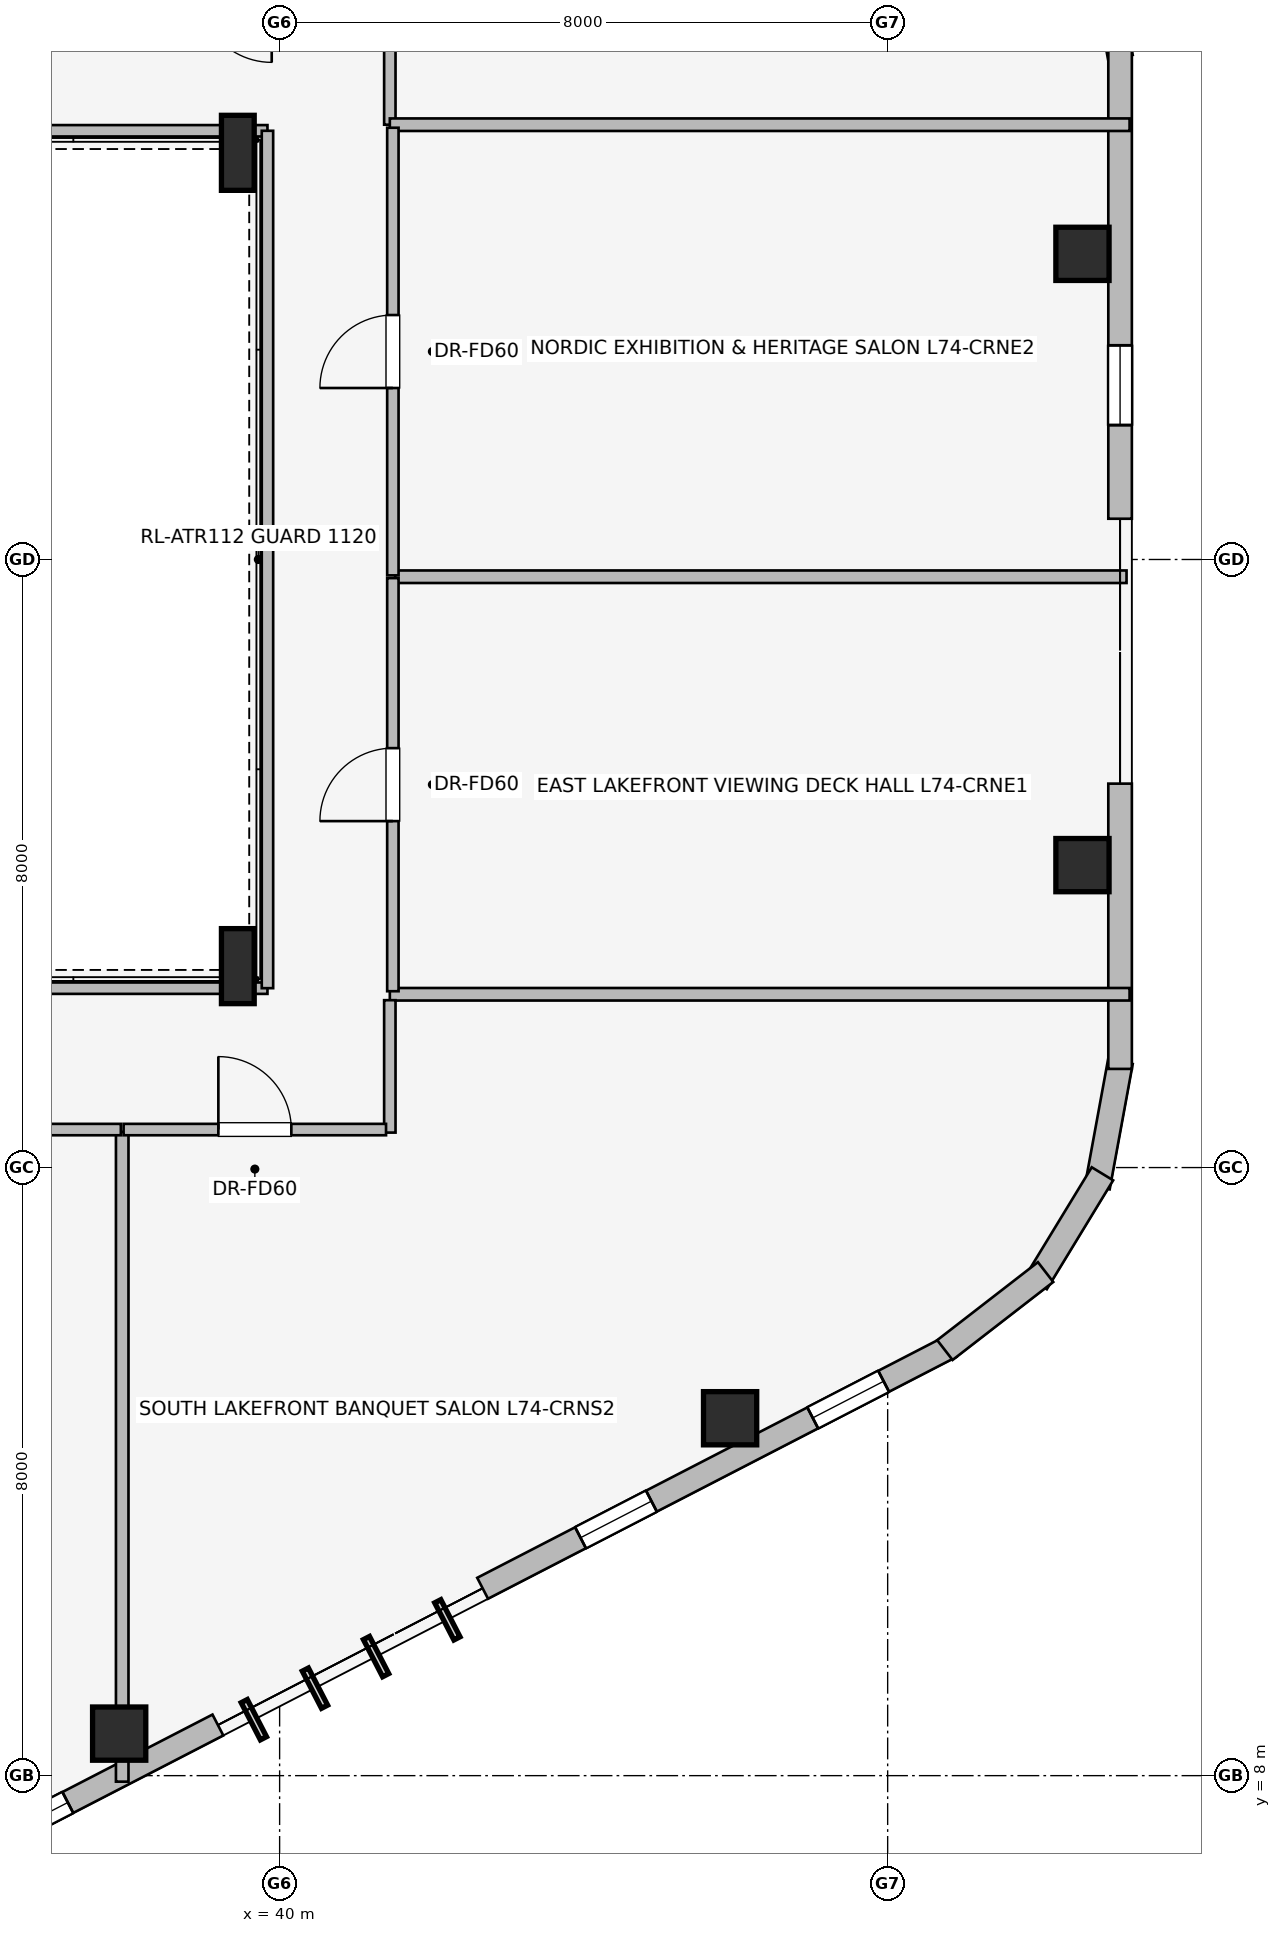
"""IFC4 building model, lengths in metres.
Left out: names, types, materials, properties, quantities, classifications, styles, units other than length and angle.
Written with IfcOpenShell. Run it as: python <this file> out.ifc"""

import sys

from ifc_helpers import new_model, si_unit, direction, frame, frame_2d, origin, origin_2d, place, context, subcontext, project, spatial, rectangle, i_section, extrude, element, fill, save


model = new_model("IFC4")
c1 = context("Model", 3, precision=1e-05, world=origin(), true_north=direction((0.0, 1.0)))
c2 = subcontext(c1, "Body", "Model", "MODEL_VIEW")
j1 = project(units=[si_unit("LENGTHUNIT", "METRE"), si_unit("PLANEANGLEUNIT", "RADIAN")], contexts=[c1])
p1 = place(None, origin())
s1 = spatial("IfcSite", under=j1, at=p1, CompositionType="ELEMENT")
p2 = place(p1, origin())
s2 = spatial("IfcBuilding", under=s1, at=p2, CompositionType="ELEMENT")
p3 = place(p2, frame((0.0, 0.0, 270.3)))
s3 = spatial("IfcBuildingStorey", under=s2, at=p3, CompositionType="ELEMENT", Elevation=270.3)
for number, where, z_axis, x_axis in (
    (1, (37.889, 8.553, 0.0), (0.0, 0.0, 1.0), (1.0, 0.0, 0.0)),
    (2, (45.927, 12.702, 0.0), (0.0, 0.0, 1.0), (1.0, 0.0, 0.0)),
    (3, (50.563, 19.979, 0.0), (0.0, 0.0, 1.0), (1.0, 0.0, 0.0)),
    (4, (50.563, 28.021, 0.0), (0.0, 0.0, 1.0), (1.0, 0.0, 0.0)),
):
    element("IfcColumn", number, at=place(p3, frame(where, z_axis=z_axis, x_axis=x_axis)), inside=s3, PredefinedType="COLUMN", context=c2, shape_type="SweptSolid", body=[
        extrude(rectangle(XDim=0.7, YDim=0.7, at=origin_2d()), origin(), (0.0, 0.0, 1.0), 4.8),
    ])
for number, where, z_axis, x_axis in (
    (5, (39.45, 18.65, 0.0), (0.0, 0.0, 1.0), (1.0, 0.0, 0.0)),
    (6, (39.45, 29.35, 0.0), (0.0, 0.0, 1.0), (1.0, 0.0, 0.0)),
):
    element("IfcColumn", number, at=place(p3, frame(where, z_axis=z_axis, x_axis=x_axis)), inside=s3, PredefinedType="COLUMN", context=c2, shape_type="SweptSolid", body=[
        extrude(i_section(OverallWidth=0.431, OverallDepth=0.987, WebThickness=0.034, FlangeThickness=0.062, at=origin_2d()), origin(), (0.0, 0.0, 1.0), 4.8),
    ])
p4 = place(p3, frame((50.759, 32.257, 0.0), z_axis=(0.0, 0.0, 1.0), x_axis=(0.180691763044, -0.983539773862, 0.0)))
e7 = element("IfcWall", 7, at=p4, inside=s3, PredefinedType="STANDARD", context=c2, shape_type="SweptSolid", body=[
    extrude(rectangle(XDim=1.677, YDim=0.33, at=frame_2d((0.838, 0.0))), origin(), (0.0, 0.0, 1.0), 4.49),
])
p5 = place(p3, frame((48.834, 13.646, 0.0), z_axis=(0.0, 0.0, 1.0), x_axis=(-0.888622971019, -0.458638436437, 0.0)))
e8 = element("IfcWall", 8, at=p5, inside=s3, PredefinedType="STANDARD", context=c2, shape_type="SweptSolid", body=[
    extrude(rectangle(XDim=6.936, YDim=0.31, at=frame_2d((3.468, 0.0))), origin(), (0.0, 0.0, 1.0), 4.49),
])
p6 = place(p5, frame((0.998, 0.0, 0.75)))
e9 = element("IfcOpeningElement", 9, at=p6, cuts=e8, PredefinedType="OPENING", context=c2, shape_type="SweptSolid", body=[
    extrude(rectangle(XDim=1.05, YDim=1.4, at=frame_2d((0.525, 0.7))), frame((0.0, 0.165, 0.0), z_axis=(0.0, -1.0, 0.0), x_axis=(1.0, 0.0, 0.0)), (0.0, 0.0, 1.0), 0.33),
])
p7 = place(p5, frame((4.436, 0.0, 0.75)))
e10 = element("IfcOpeningElement", 10, at=p7, cuts=e8, PredefinedType="OPENING", context=c2, shape_type="SweptSolid", body=[
    extrude(rectangle(XDim=1.05, YDim=1.4, at=frame_2d((0.525, 0.7))), frame((0.0, 0.165, 0.0), z_axis=(0.0, -1.0, 0.0), x_axis=(1.0, 0.0, 0.0)), (0.0, 0.0, 1.0), 0.33),
])
p8 = place(p3, frame((39.188, 8.666, 0.0), z_axis=(0.0, 0.0, 1.0), x_axis=(-0.888616094641, -0.45865175934, 0.0)))
e11 = element("IfcWall", 11, at=p8, inside=s3, PredefinedType="STANDARD", context=c2, shape_type="SweptSolid", body=[
    extrude(rectangle(XDim=4.221, YDim=0.31, at=frame_2d((2.111, 0.0))), origin(), (0.0, 0.0, 1.0), 4.49),
])
p9 = place(p8, frame((2.222, 0.0, 0.75)))
e12 = element("IfcOpeningElement", 12, at=p9, cuts=e11, PredefinedType="OPENING", context=c2, shape_type="SweptSolid", body=[
    extrude(rectangle(XDim=1.05, YDim=1.4, at=frame_2d((0.525, 0.7))), frame((0.0, 0.165, 0.0), z_axis=(0.0, -1.0, 0.0), x_axis=(1.0, 0.0, 0.0)), (0.0, 0.0, 1.0), 0.33),
])
p10 = place(p3, frame((51.062, 17.392, 0.0), z_axis=(0.0, 0.0, 1.0), x_axis=(-0.180691763044, -0.983539773862, 0.0)))
e13 = element("IfcWall", 13, at=p10, inside=s3, PredefinedType="STANDARD", context=c2, shape_type="SweptSolid", body=[
    extrude(rectangle(XDim=1.677, YDim=0.33, at=frame_2d((0.838, 0.0))), origin(), (0.0, 0.0, 1.0), 4.49),
])
p11 = place(p3, frame((50.826, 15.918, 0.0), z_axis=(0.0, 0.0, 1.0), x_axis=(-0.520325409202, -0.853968072318, 0.0)))
e14 = element("IfcWall", 14, at=p11, inside=s3, PredefinedType="STANDARD", context=c2, shape_type="SweptSolid", body=[
    extrude(rectangle(XDim=1.678, YDim=0.33, at=frame_2d((0.839, 0.0))), origin(), (0.0, 0.0, 1.0), 4.49),
])
p12 = place(p3, frame((50.078, 14.625, 0.0), z_axis=(0.0, 0.0, 1.0), x_axis=(-0.790691856293, -0.61221433207, 0.0)))
e15 = element("IfcWall", 15, at=p12, inside=s3, PredefinedType="STANDARD", context=c2, shape_type="SweptSolid", body=[
    extrude(rectangle(XDim=1.676, YDim=0.33, at=frame_2d((0.838, 0.0))), origin(), (0.0, 0.0, 1.0), 4.49),
])
p13 = place(p3, frame((51.058, 30.702, 0.0), z_axis=(0.0, 0.0, 1.0), x_axis=(0.0, -1.0, 0.0)))
e16 = element("IfcWall", 16, at=p13, inside=s3, PredefinedType="STANDARD", context=c2, shape_type="SweptSolid", body=[
    extrude(rectangle(XDim=6.166, YDim=0.31, at=frame_2d((3.083, 0.0))), origin(), (0.0, 0.0, 1.0), 4.49),
])
p14 = place(p13, frame((3.884, 0.0, 0.75)))
e17 = element("IfcOpeningElement", 17, at=p14, cuts=e16, PredefinedType="OPENING", context=c2, shape_type="SweptSolid", body=[
    extrude(rectangle(XDim=1.05, YDim=1.4, at=frame_2d((0.525, 0.7))), frame((0.0, 0.165, 0.0), z_axis=(0.0, -1.0, 0.0), x_axis=(1.0, 0.0, 0.0)), (0.0, 0.0, 1.0), 0.33),
])
p15 = place(p3, frame((51.058, 21.051, 0.0), z_axis=(0.0, 0.0, 1.0), x_axis=(0.0, -1.0, 0.0)))
e18 = element("IfcWall", 18, at=p15, inside=s3, PredefinedType="STANDARD", context=c2, shape_type="SweptSolid", body=[
    extrude(rectangle(XDim=3.753, YDim=0.31, at=frame_2d((1.876, 0.0))), origin(), (0.0, 0.0, 1.0), 4.49),
])
p16 = place(p3, frame((27.675, 18.36, 0.0), z_axis=(0.0, 0.0, 1.0), x_axis=(1.0, 0.0, 0.0)))
e19 = element("IfcWall", 19, at=p16, inside=s3, PredefinedType="PARTITIONING", context=c2, shape_type="SweptSolid", body=[
    extrude(rectangle(XDim=12.165, YDim=0.15, at=frame_2d((6.083, 0.0))), origin(), (0.0, 0.0, 1.0), 3.631),
])
p17 = place(p3, frame((39.84, 29.64, 0.0), z_axis=(0.0, 0.0, 1.0), x_axis=(-1.0, 0.0, 0.0)))
e20 = element("IfcWall", 20, at=p17, inside=s3, PredefinedType="PARTITIONING", context=c2, shape_type="SweptSolid", body=[
    extrude(rectangle(XDim=12.203, YDim=0.15, at=frame_2d((6.102, 0.0))), origin(), (0.0, 0.0, 1.0), 3.631),
])
p18 = place(p3, frame((39.84, 18.36, 0.0), z_axis=(0.0, 0.0, 1.0), x_axis=(0.0, 1.0, 0.0)))
e21 = element("IfcWall", 21, at=p18, inside=s3, PredefinedType="PARTITIONING", context=c2, shape_type="SweptSolid", body=[
    extrude(rectangle(XDim=11.28, YDim=0.15, at=frame_2d((5.64, 0.0))), origin(), (0.0, 0.0, 1.0), 4.49),
])
p19 = place(p3, frame((41.45, 29.72, 0.0), z_axis=(0.0, 0.0, 1.0), x_axis=(0.0, 1.0, 0.0)))
e22 = element("IfcWall", 22, at=p19, inside=s3, PredefinedType="PARTITIONING", context=c2, shape_type="SweptSolid", body=[
    extrude(rectangle(XDim=1.82, YDim=0.15, at=frame_2d((0.91, 0.0))), origin(), (0.0, 0.0, 1.0), 4.49),
])
p20 = place(p3, frame((41.45, 18.28, 0.0), z_axis=(0.0, 0.0, 1.0), x_axis=(1.0, 0.0, 0.0)))
e23 = element("IfcWall", 23, at=p20, inside=s3, PredefinedType="PARTITIONING", context=c2, shape_type="SweptSolid", body=[
    extrude(rectangle(XDim=9.733, YDim=0.165, at=frame_2d((4.867, 0.0))), origin(), (0.0, 0.0, 1.0), 4.49),
])
p21 = place(p3, frame((41.45, 29.72, 0.0), z_axis=(0.0, 0.0, 1.0), x_axis=(1.0, 0.0, 0.0)))
e24 = element("IfcWall", 24, at=p21, inside=s3, PredefinedType="PARTITIONING", context=c2, shape_type="SweptSolid", body=[
    extrude(rectangle(XDim=9.733, YDim=0.165, at=frame_2d((4.867, 0.0))), origin(), (0.0, 0.0, 1.0), 3.824),
])
p22 = place(p3, frame((41.52, 23.773, 0.0), z_axis=(0.0, 0.0, 1.0), x_axis=(1.0, 0.0, 0.0)))
e25 = element("IfcWall", 25, at=p22, inside=s3, PredefinedType="PARTITIONING", context=c2, shape_type="SweptSolid", body=[
    extrude(rectangle(XDim=9.623, YDim=0.165, at=frame_2d((4.812, 0.0))), origin(), (0.0, 0.0, 1.0), 4.49),
])
p23 = place(p3, frame((41.49, 18.32, 0.0), z_axis=(0.0, 0.0, 1.0), x_axis=(0.0, 1.0, 0.0)))
e26 = element("IfcWall", 26, at=p23, inside=s3, PredefinedType="PARTITIONING", context=c2, shape_type="SweptSolid", body=[
    extrude(rectangle(XDim=5.435, YDim=0.15, at=frame_2d((2.717, 0.0))), origin(), (0.0, 0.0, 1.0), 4.49),
])
p24 = place(p23, frame((2.238, 0.0, 0.0)))
e27 = element("IfcOpeningElement", 27, at=p24, cuts=e26, PredefinedType="OPENING", context=c2, shape_type="SweptSolid", body=[
    extrude(rectangle(XDim=0.96, YDim=2.0, at=frame_2d((0.48, 1.0))), frame((0.0, 0.085, 0.0), z_axis=(0.0, -1.0, 0.0), x_axis=(1.0, 0.0, 0.0)), (0.0, 0.0, 1.0), 0.17),
])
p25 = place(p3, frame((41.49, 23.791, 0.0), z_axis=(0.0, 0.0, 1.0), x_axis=(0.0, 1.0, 0.0)))
e28 = element("IfcWall", 28, at=p25, inside=s3, PredefinedType="PARTITIONING", context=c2, shape_type="SweptSolid", body=[
    extrude(rectangle(XDim=5.889, YDim=0.15, at=frame_2d((2.944, 0.0))), origin(), (0.0, 0.0, 1.0), 4.49),
])
p26 = place(p25, frame((2.465, 0.0, 0.0)))
e29 = element("IfcOpeningElement", 29, at=p26, cuts=e28, PredefinedType="OPENING", context=c2, shape_type="SweptSolid", body=[
    extrude(rectangle(XDim=0.96, YDim=2.0, at=frame_2d((0.48, 1.0))), frame((0.0, 0.085, 0.0), z_axis=(0.0, -1.0, 0.0), x_axis=(1.0, 0.0, 0.0)), (0.0, 0.0, 1.0), 0.17),
])
p27 = place(p3, frame((41.45, 16.46, 0.0), z_axis=(0.0, 0.0, 1.0), x_axis=(0.0, 1.0, 0.0)))
e30 = element("IfcWall", 30, at=p27, inside=s3, PredefinedType="PARTITIONING", context=c2, shape_type="SweptSolid", body=[
    extrude(rectangle(XDim=1.742, YDim=0.15, at=frame_2d((0.871, 0.0))), origin(), (0.0, 0.0, 1.0), 4.49),
])
p28 = place(p3, frame((37.929, 7.921, 0.0), z_axis=(0.0, 0.0, 1.0), x_axis=(0.0, 1.0, 0.0)))
e31 = element("IfcWall", 31, at=p28, inside=s3, PredefinedType="PARTITIONING", context=c2, shape_type="SweptSolid", body=[
    extrude(rectangle(XDim=8.549, YDim=0.165, at=frame_2d((4.274, 0.0))), origin(), (0.0, 0.0, 1.0), 3.879),
])
p29 = place(p3, frame((32.85, 16.5, 0.0), z_axis=(0.0, 0.0, 1.0), x_axis=(1.0, 0.0, 0.0)))
e32 = element("IfcWall", 32, at=p29, inside=s3, PredefinedType="PARTITIONING", context=c2, shape_type="SweptSolid", body=[
    extrude(rectangle(XDim=5.061, YDim=0.15, at=frame_2d((2.53, 0.0))), origin(), (0.0, 0.0, 1.0), 4.49),
])
p30 = place(p29, frame((2.051, 0.0, 0.0)))
e33 = element("IfcOpeningElement", 33, at=p30, cuts=e32, PredefinedType="OPENING", context=c2, shape_type="SweptSolid", body=[
    extrude(rectangle(XDim=0.96, YDim=2.0, at=frame_2d((0.48, 1.0))), frame((0.0, 0.085, 0.0), z_axis=(0.0, -1.0, 0.0), x_axis=(1.0, 0.0, 0.0)), (0.0, 0.0, 1.0), 0.17),
])
p31 = place(p3, frame((37.947, 16.5, 0.0), z_axis=(0.0, 0.0, 1.0), x_axis=(1.0, 0.0, 0.0)))
e34 = element("IfcWall", 34, at=p31, inside=s3, PredefinedType="PARTITIONING", context=c2, shape_type="SweptSolid", body=[
    extrude(rectangle(XDim=3.453, YDim=0.15, at=frame_2d((1.727, 0.0))), origin(), (0.0, 0.0, 1.0), 4.49),
])
p32 = place(p31, frame((1.247, 0.0, 0.0)))
e35 = element("IfcOpeningElement", 35, at=p32, cuts=e34, PredefinedType="OPENING", context=c2, shape_type="SweptSolid", body=[
    extrude(rectangle(XDim=0.96, YDim=2.0, at=frame_2d((0.48, 1.0))), frame((0.0, 0.085, 0.0), z_axis=(0.0, -1.0, 0.0), x_axis=(1.0, 0.0, 0.0)), (0.0, 0.0, 1.0), 0.17),
])
p33 = place(p6, origin())
e36 = element("IfcWindow", 36, at=p33, inside=s3, PartitioningType="SINGLE_PANEL", PredefinedType="WINDOW", context=c2, shape_type="SweptSolid", body=[
    extrude(rectangle(XDim=1.05, YDim=1.4, at=frame_2d((0.525, 0.7))), frame((0.0, 0.03, 0.0), z_axis=(0.0, -1.0, 0.0), x_axis=(1.0, 0.0, 0.0)), (0.0, 0.0, 1.0), 0.06),
])
fill(e9, e36)
p34 = place(p7, origin())
e37 = element("IfcWindow", 37, at=p34, inside=s3, PartitioningType="SINGLE_PANEL", PredefinedType="WINDOW", context=c2, shape_type="SweptSolid", body=[
    extrude(rectangle(XDim=1.05, YDim=1.4, at=frame_2d((0.525, 0.7))), frame((0.0, 0.03, 0.0), z_axis=(0.0, -1.0, 0.0), x_axis=(1.0, 0.0, 0.0)), (0.0, 0.0, 1.0), 0.06),
])
fill(e10, e37)
p35 = place(p9, origin())
e38 = element("IfcWindow", 38, at=p35, inside=s3, PartitioningType="SINGLE_PANEL", PredefinedType="WINDOW", context=c2, shape_type="SweptSolid", body=[
    extrude(rectangle(XDim=1.05, YDim=1.4, at=frame_2d((0.525, 0.7))), frame((0.0, 0.03, 0.0), z_axis=(0.0, -1.0, 0.0), x_axis=(1.0, 0.0, 0.0)), (0.0, 0.0, 1.0), 0.06),
])
fill(e12, e38)
p36 = place(p14, origin())
e39 = element("IfcWindow", 39, at=p36, inside=s3, PartitioningType="SINGLE_PANEL", PredefinedType="WINDOW", context=c2, shape_type="SweptSolid", body=[
    extrude(rectangle(XDim=1.05, YDim=1.4, at=frame_2d((0.525, 0.7))), frame((0.0, 0.03, 0.0), z_axis=(0.0, -1.0, 0.0), x_axis=(1.0, 0.0, 0.0)), (0.0, 0.0, 1.0), 0.06),
])
fill(e17, e39)
p37 = place(p24, origin())
e40 = element("IfcDoor", 40, at=p37, inside=s3, OperationType="SINGLE_SWING_LEFT", PredefinedType="DOOR", context=c2, shape_type="SweptSolid", body=[
    extrude(rectangle(XDim=0.96, YDim=2.0, at=frame_2d((0.48, 1.0))), frame((0.0, 0.025, 0.0), z_axis=(0.0, -1.0, 0.0), x_axis=(1.0, 0.0, 0.0)), (0.0, 0.0, 1.0), 0.05),
])
fill(e27, e40)
p38 = place(p26, origin())
e41 = element("IfcDoor", 41, at=p38, inside=s3, OperationType="SINGLE_SWING_LEFT", PredefinedType="DOOR", context=c2, shape_type="SweptSolid", body=[
    extrude(rectangle(XDim=0.96, YDim=2.0, at=frame_2d((0.48, 1.0))), frame((0.0, 0.025, 0.0), z_axis=(0.0, -1.0, 0.0), x_axis=(1.0, 0.0, 0.0)), (0.0, 0.0, 1.0), 0.05),
])
fill(e29, e41)
p39 = place(p32, origin())
e42 = element("IfcDoor", 42, at=p39, inside=s3, OperationType="SINGLE_SWING_LEFT", PredefinedType="DOOR", context=c2, shape_type="SweptSolid", body=[
    extrude(rectangle(XDim=0.96, YDim=2.0, at=frame_2d((0.48, 1.0))), frame((0.0, 0.025, 0.0), z_axis=(0.0, -1.0, 0.0), x_axis=(1.0, 0.0, 0.0)), (0.0, 0.0, 1.0), 0.05),
])
fill(e35, e42)
save(model, sys.argv[1])
